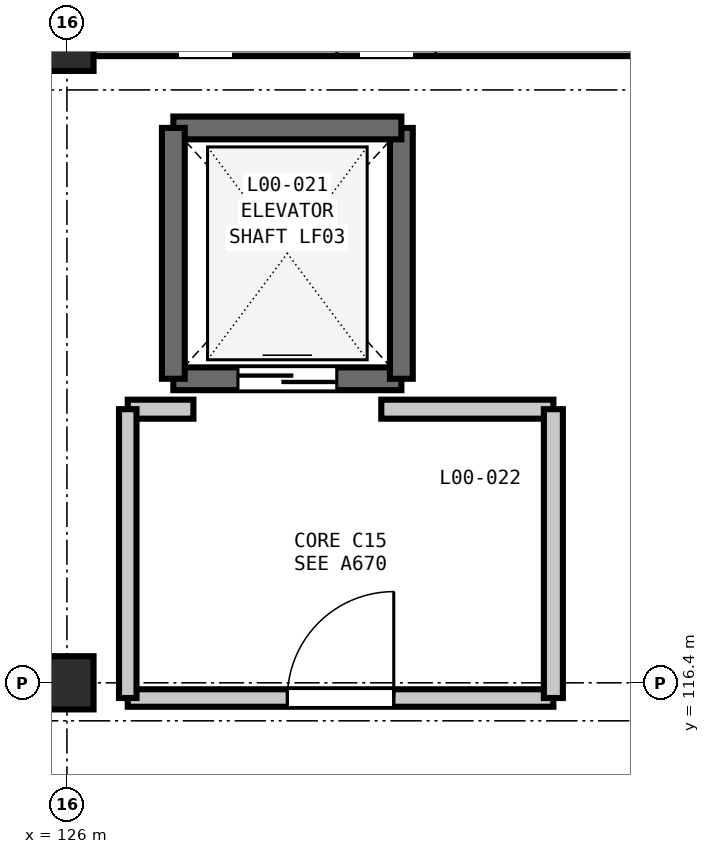
"""IFC4 building model, lengths in metres.
Left out: names, types, materials, properties, quantities, classifications, styles, units other than length and angle.
Written with IfcOpenShell. Run it as: python <this file> out.ifc"""

import sys

from ifc_helpers import new_model, si_unit, direction, frame, frame_2d, origin, origin_2d, place, context, subcontext, project, spatial, rectangle, extrude, element, fill, save


model = new_model("IFC4")
c1 = context("Model", 3, precision=1e-05, world=origin(), true_north=direction((0.0, 1.0)))
c2 = subcontext(c1, "Body", "Model", "MODEL_VIEW")
j1 = project(units=[si_unit("LENGTHUNIT", "METRE"), si_unit("PLANEANGLEUNIT", "RADIAN")], contexts=[c1])
p1 = place(None, origin())
s1 = spatial("IfcSite", under=j1, at=p1, CompositionType="ELEMENT")
p2 = place(p1, origin())
s2 = spatial("IfcBuilding", under=s1, at=p2, CompositionType="ELEMENT")
p3 = place(p2, origin())
s3 = spatial("IfcBuildingStorey", under=s2, at=p3, CompositionType="ELEMENT", Elevation=0.0)
for number, where, z_axis, x_axis in (
    (1, (126.0, 116.4, 0.0), (0.0, 0.0, 1.0), (1.0, 0.0, 0.0)),
    (2, (126.0, 124.8, 0.0), (0.0, 0.0, 1.0), (1.0, 0.0, 0.0)),
):
    element("IfcColumn", number, at=place(p3, frame(where, z_axis=z_axis, x_axis=x_axis)), inside=s3, PredefinedType="COLUMN", context=c2, shape_type="SweptSolid", body=[
        extrude(rectangle(XDim=0.7, YDim=0.7, at=origin_2d()), origin(), (0.0, 0.0, 1.0), 5.4),
    ])
p4 = place(p3, frame((126.348, 124.8, 0.0), z_axis=(0.0, 0.0, 1.0), x_axis=(1.0, 0.0, 0.0)))
e3 = element("IfcWall", 3, at=p4, inside=s3, PredefinedType="SOLIDWALL", context=c2, shape_type="SweptSolid", body=[
    extrude(rectangle(XDim=7.704, YDim=0.31, at=frame_2d((3.852, 0.0))), origin(), (0.0, 0.0, 1.0), 4.68),
])
p5 = place(p4, frame((3.202, 0.0, 0.9)))
e4 = element("IfcOpeningElement", 4, at=p5, cuts=e3, PredefinedType="OPENING", context=c2, shape_type="SweptSolid", body=[
    extrude(rectangle(XDim=1.3, YDim=1.75, at=frame_2d((0.65, 0.875))), frame((0.0, 0.165, 0.0), z_axis=(0.0, -1.0, 0.0), x_axis=(1.0, 0.0, 0.0)), (0.0, 0.0, 1.0), 0.33),
])
p6 = place(p3, frame((127.4, 120.4, 0.0), z_axis=(0.0, 0.0, 1.0), x_axis=(1.0, 0.0, 0.0)))
e5 = element("IfcWall", 5, at=p6, inside=s3, PredefinedType="SHEAR", context=c2, shape_type="SweptSolid", body=[
    extrude(rectangle(XDim=3.0, YDim=0.3, at=frame_2d((1.5, 0.0))), origin(), (0.0, 0.0, 1.0), 5.4),
])
p7 = place(p6, frame((0.85, 0.0, 0.0)))
e6 = element("IfcOpeningElement", 6, at=p7, cuts=e5, PredefinedType="OPENING", context=c2, shape_type="SweptSolid", body=[
    extrude(rectangle(XDim=1.3, YDim=2.2, at=frame_2d((0.65, 1.1))), frame((0.0, 0.16, 0.0), z_axis=(0.0, -1.0, 0.0), x_axis=(1.0, 0.0, 0.0)), (0.0, 0.0, 1.0), 0.32),
])
p8 = place(p3, frame((130.4, 120.4, 0.0), z_axis=(0.0, 0.0, 1.0), x_axis=(0.0, 1.0, 0.0)))
e7 = element("IfcWall", 7, at=p8, inside=s3, PredefinedType="SHEAR", context=c2, shape_type="SweptSolid", body=[
    extrude(rectangle(XDim=3.3, YDim=0.3, at=frame_2d((1.65, 0.0))), origin(), (0.0, 0.0, 1.0), 5.4),
])
p9 = place(p3, frame((130.4, 123.7, 0.0), z_axis=(0.0, 0.0, 1.0), x_axis=(-1.0, 0.0, 0.0)))
e8 = element("IfcWall", 8, at=p9, inside=s3, PredefinedType="SHEAR", context=c2, shape_type="SweptSolid", body=[
    extrude(rectangle(XDim=3.0, YDim=0.3, at=frame_2d((1.5, 0.0))), origin(), (0.0, 0.0, 1.0), 5.4),
])
p10 = place(p3, frame((127.4, 123.7, 0.0), z_axis=(0.0, 0.0, 1.0), x_axis=(0.0, -1.0, 0.0)))
e9 = element("IfcWall", 9, at=p10, inside=s3, PredefinedType="SHEAR", context=c2, shape_type="SweptSolid", body=[
    extrude(rectangle(XDim=3.3, YDim=0.3, at=frame_2d((1.65, 0.0))), origin(), (0.0, 0.0, 1.0), 5.4),
])
p11 = place(p3, frame((126.8, 116.2, 0.0), z_axis=(0.0, 0.0, 1.0), x_axis=(1.0, 0.0, 0.0)))
e10 = element("IfcWall", 10, at=p11, inside=s3, PredefinedType="PARTITIONING", context=c2, shape_type="SweptSolid", body=[
    extrude(rectangle(XDim=5.6, YDim=0.23, at=frame_2d((2.8, 0.0))), origin(), (0.0, 0.0, 1.0), 4.635),
])
p12 = place(p11, frame((2.1, 0.0, 0.0)))
e11 = element("IfcOpeningElement", 11, at=p12, cuts=e10, PredefinedType="OPENING", context=c2, shape_type="SweptSolid", body=[
    extrude(rectangle(XDim=1.4, YDim=2.2, at=frame_2d((0.7, 1.1))), frame((0.0, 0.125, 0.0), z_axis=(0.0, -1.0, 0.0), x_axis=(1.0, 0.0, 0.0)), (0.0, 0.0, 1.0), 0.25),
])
p13 = place(p3, frame((130.136, 120.0, 0.0), z_axis=(0.0, 0.0, 1.0), x_axis=(1.0, 0.0, 0.0)))
e12 = element("IfcWall", 12, at=p13, inside=s3, PredefinedType="PARTITIONING", context=c2, shape_type="SweptSolid", body=[
    extrude(rectangle(XDim=2.264, YDim=0.25, at=frame_2d((1.132, 0.0))), origin(), (0.0, 0.0, 1.0), 5.04),
])
p14 = place(p3, frame((126.8, 120.0, 0.0), z_axis=(0.0, 0.0, 1.0), x_axis=(1.0, 0.0, 0.0)))
e13 = element("IfcWall", 13, at=p14, inside=s3, PredefinedType="PARTITIONING", context=c2, shape_type="SweptSolid", body=[
    extrude(rectangle(XDim=0.864, YDim=0.25, at=frame_2d((0.432, 0.0))), origin(), (0.0, 0.0, 1.0), 5.04),
])
p15 = place(p3, frame((126.8, 116.2, 0.0), z_axis=(0.0, 0.0, 1.0), x_axis=(0.0, 1.0, 0.0)))
e14 = element("IfcWall", 14, at=p15, inside=s3, PredefinedType="PARTITIONING", context=c2, shape_type="SweptSolid", body=[
    extrude(rectangle(XDim=3.8, YDim=0.23, at=frame_2d((1.9, 0.0))), origin(), (0.0, 0.0, 1.0), 5.04),
])
p16 = place(p3, frame((132.4, 116.2, 0.0), z_axis=(0.0, 0.0, 1.0), x_axis=(0.0, 1.0, 0.0)))
e15 = element("IfcWall", 15, at=p16, inside=s3, PredefinedType="PARTITIONING", context=c2, shape_type="SweptSolid", body=[
    extrude(rectangle(XDim=3.8, YDim=0.25, at=frame_2d((1.9, 0.0))), origin(), (0.0, 0.0, 1.0), 5.04),
])
p17 = place(p7, origin())
e16 = element("IfcDoor", 16, at=p17, inside=s3, OperationType="DOUBLE_DOOR_SLIDING", PredefinedType="DOOR", context=c2, shape_type="SweptSolid", body=[
    extrude(rectangle(XDim=1.3, YDim=2.2, at=frame_2d((0.65, 1.1))), frame((0.0, 0.025, 0.0), z_axis=(0.0, -1.0, 0.0), x_axis=(1.0, 0.0, 0.0)), (0.0, 0.0, 1.0), 0.05),
])
fill(e6, e16)
p18 = place(p12, origin())
e17 = element("IfcDoor", 17, at=p18, inside=s3, OperationType="SINGLE_SWING_RIGHT", PredefinedType="DOOR", context=c2, shape_type="SweptSolid", body=[
    extrude(rectangle(XDim=1.4, YDim=2.2, at=frame_2d((0.7, 1.1))), frame((0.0, 0.025, 0.0), z_axis=(0.0, -1.0, 0.0), x_axis=(1.0, 0.0, 0.0)), (0.0, 0.0, 1.0), 0.05),
])
fill(e11, e17)
save(model, sys.argv[1])
